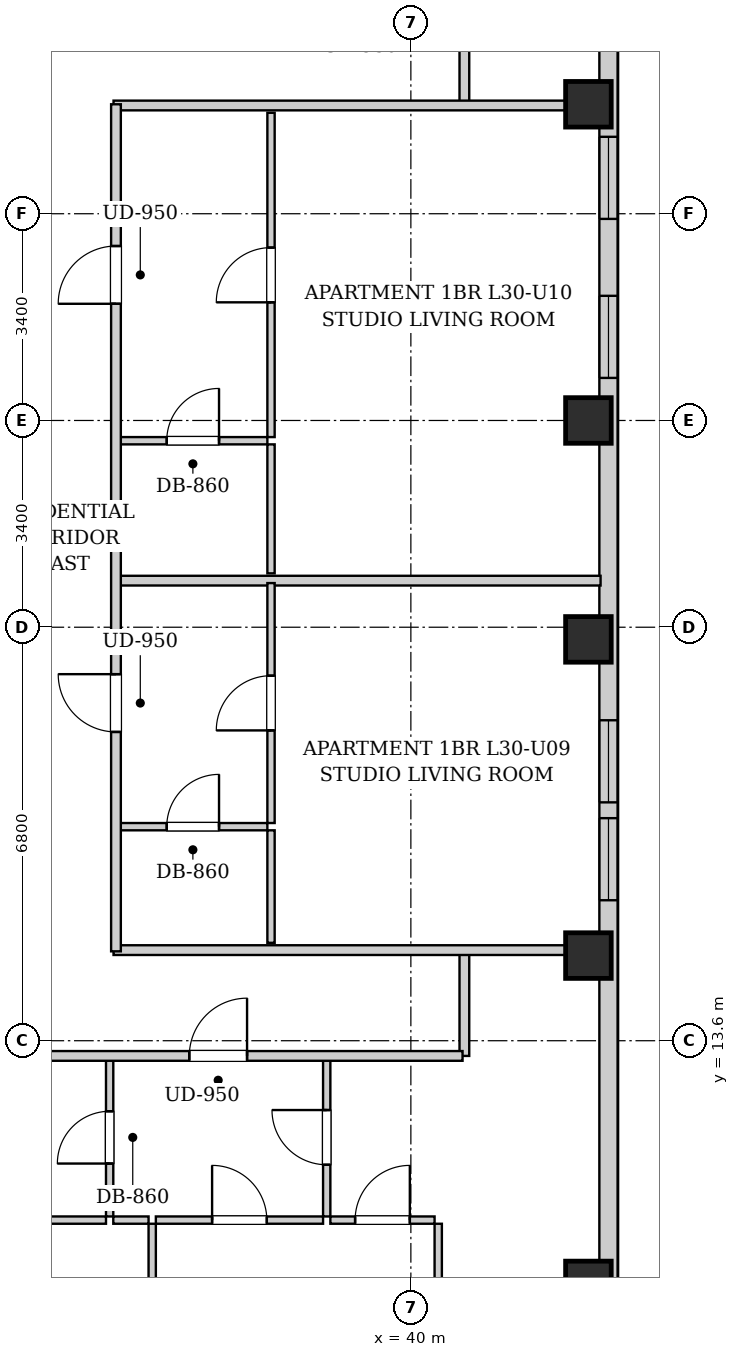
"""IFC4 building model, lengths in metres.
Left out: names, types, materials, properties, quantities, classifications, styles, units other than length and angle.
Written with IfcOpenShell. Run it as: python <this file> out.ifc"""

import sys

from ifc_helpers import new_model, si_unit, direction, frame, frame_2d, origin, origin_2d, place, context, subcontext, project, spatial, rectangle, extrude, element, fill, save


model = new_model("IFC4")
c1 = context("Model", 3, precision=1e-05, world=origin(), true_north=direction((0.0, 1.0)))
c2 = subcontext(c1, "Body", "Model", "MODEL_VIEW")
j1 = project(units=[si_unit("LENGTHUNIT", "METRE"), si_unit("PLANEANGLEUNIT", "RADIAN")], contexts=[c1])
p1 = place(None, origin())
s1 = spatial("IfcSite", under=j1, at=p1, CompositionType="ELEMENT")
p2 = place(p1, origin())
s2 = spatial("IfcBuilding", under=s1, at=p2, CompositionType="ELEMENT")
p3 = place(p2, frame((0.0, 0.0, 107.1)))
s3 = spatial("IfcBuildingStorey", under=s2, at=p3, CompositionType="ELEMENT", Elevation=107.1)
for number, where, z_axis, x_axis in (
    (1, (42.92, 9.6, 0.0), (0.0, 0.0, 1.0), (1.0, 0.0, 0.0)),
    (2, (42.92, 15.0, 0.0), (0.0, 0.0, 1.0), (1.0, 0.0, 0.0)),
    (3, (42.92, 20.2, 0.0), (0.0, 0.0, 1.0), (1.0, 0.0, 0.0)),
    (4, (42.92, 23.8, 0.0), (0.0, 0.0, 1.0), (1.0, 0.0, 0.0)),
    (5, (42.92, 29.0, 0.0), (0.0, 0.0, 1.0), (1.0, 0.0, 0.0)),
):
    element("IfcColumn", number, at=place(p3, frame(where, z_axis=z_axis, x_axis=x_axis)), inside=s3, PredefinedType="COLUMN", context=c2, shape_type="SweptSolid", body=[
        extrude(rectangle(XDim=0.75, YDim=0.75, at=origin_2d()), origin(), (0.0, 0.0, 1.0), 3.2),
    ])
p4 = place(p3, frame((43.25, 40.8, 0.0), z_axis=(0.0, 0.0, 1.0), x_axis=(0.0, -1.0, 0.0)))
e6 = element("IfcWall", 6, at=p4, inside=s3, PredefinedType="SOLIDWALL", context=c2, shape_type="SweptSolid", body=[
    extrude(rectangle(XDim=38.3, YDim=0.3, at=frame_2d((19.15, 0.0))), origin(), (0.0, 0.0, 1.0), 2.94),
])
p5 = place(p4, frame((33.495, 0.0, 0.55)))
e7 = element("IfcOpeningElement", 7, at=p5, cuts=e6, PredefinedType="OPENING", context=c2, shape_type="SweptSolid", body=[
    extrude(rectangle(XDim=1.35, YDim=1.2, at=frame_2d((0.675, 0.6))), frame((0.0, 0.16, 0.0), z_axis=(0.0, -1.0, 0.0), x_axis=(1.0, 0.0, 0.0)), (0.0, 0.0, 1.0), 0.32),
])
p6 = place(p4, frame((31.735, 0.0, 0.55)))
e8 = element("IfcOpeningElement", 8, at=p6, cuts=e6, PredefinedType="OPENING", context=c2, shape_type="SweptSolid", body=[
    extrude(rectangle(XDim=1.35, YDim=1.2, at=frame_2d((0.675, 0.6))), frame((0.0, 0.16, 0.0), z_axis=(0.0, -1.0, 0.0), x_axis=(1.0, 0.0, 0.0)), (0.0, 0.0, 1.0), 0.32),
])
p7 = place(p4, frame((21.93, 0.0, 0.55)))
e9 = element("IfcOpeningElement", 9, at=p7, cuts=e6, PredefinedType="OPENING", context=c2, shape_type="SweptSolid", body=[
    extrude(rectangle(XDim=1.35, YDim=1.2, at=frame_2d((0.675, 0.6))), frame((0.0, 0.16, 0.0), z_axis=(0.0, -1.0, 0.0), x_axis=(1.0, 0.0, 0.0)), (0.0, 0.0, 1.0), 0.32),
])
p8 = place(p4, frame((23.54, 0.0, 0.55)))
e10 = element("IfcOpeningElement", 10, at=p8, cuts=e6, PredefinedType="OPENING", context=c2, shape_type="SweptSolid", body=[
    extrude(rectangle(XDim=1.35, YDim=1.2, at=frame_2d((0.675, 0.6))), frame((0.0, 0.16, 0.0), z_axis=(0.0, -1.0, 0.0), x_axis=(1.0, 0.0, 0.0)), (0.0, 0.0, 1.0), 0.32),
])
p9 = place(p4, frame((14.95, 0.0, 0.55)))
e11 = element("IfcOpeningElement", 11, at=p9, cuts=e6, PredefinedType="OPENING", context=c2, shape_type="SweptSolid", body=[
    extrude(rectangle(XDim=1.35, YDim=1.2, at=frame_2d((0.675, 0.6))), frame((0.0, 0.16, 0.0), z_axis=(0.0, -1.0, 0.0), x_axis=(1.0, 0.0, 0.0)), (0.0, 0.0, 1.0), 0.32),
])
p10 = place(p4, frame((12.335, 0.0, 0.55)))
e12 = element("IfcOpeningElement", 12, at=p10, cuts=e6, PredefinedType="OPENING", context=c2, shape_type="SweptSolid", body=[
    extrude(rectangle(XDim=1.35, YDim=1.2, at=frame_2d((0.675, 0.6))), frame((0.0, 0.16, 0.0), z_axis=(0.0, -1.0, 0.0), x_axis=(1.0, 0.0, 0.0)), (0.0, 0.0, 1.0), 0.32),
])
for number, where, z_axis, x_axis in (
    (13, (40.88, 13.35, 0.0), (0.0, 0.0, 1.0), (0.0, 1.0, 0.0)),
    (14, (40.88, 28.98, 0.0), (0.0, 0.0, 1.0), (0.0, 1.0, 0.0)),
):
    element("IfcWall", number, at=place(p3, frame(where, z_axis=z_axis, x_axis=x_axis)), inside=s3, PredefinedType="PARTITIONING", context=c2, shape_type="SweptSolid", body=[
        extrude(rectangle(XDim=1.74, YDim=0.16, at=frame_2d((0.87, 0.0))), origin(), (0.0, 0.0, 1.0), 2.94),
    ])
for number, where, z_axis, x_axis in (
    (15, (35.11, 15.09, 0.0), (0.0, 0.0, 1.0), (1.0, 0.0, 0.0)),
    (16, (35.11, 28.98, 0.0), (0.0, 0.0, 1.0), (1.0, 0.0, 0.0)),
):
    element("IfcWall", number, at=place(p3, frame(where, z_axis=z_axis, x_axis=x_axis)), inside=s3, PredefinedType="PARTITIONING", context=c2, shape_type="SweptSolid", body=[
        extrude(rectangle(XDim=8.01, YDim=0.16, at=frame_2d((4.005, 0.0))), origin(), (0.0, 0.0, 1.0), 2.313),
    ])
p11 = place(p3, frame((35.046, 10.71, 0.0), z_axis=(0.0, 0.0, 1.0), x_axis=(0.0, 1.0, 0.0)))
e17 = element("IfcWall", 17, at=p11, inside=s3, PredefinedType="PARTITIONING", context=c2, shape_type="SweptSolid", body=[
    extrude(rectangle(XDim=2.6, YDim=0.12, at=frame_2d((1.3, 0.0))), origin(), (0.0, 0.0, 1.0), 2.94),
])
p12 = place(p11, frame((0.87, 0.0, 0.0)))
e18 = element("IfcOpeningElement", 18, at=p12, cuts=e17, PredefinedType="OPENING", context=c2, shape_type="SweptSolid", body=[
    extrude(rectangle(XDim=0.86, YDim=2.05, at=frame_2d((0.43, 1.025))), frame((0.0, 0.07, 0.0), z_axis=(0.0, -1.0, 0.0), x_axis=(1.0, 0.0, 0.0)), (0.0, 0.0, 1.0), 0.14),
])
p13 = place(p3, frame((32.586, 10.65, 0.0), z_axis=(0.0, 0.0, 1.0), x_axis=(1.0, 0.0, 0.0)))
e19 = element("IfcWall", 19, at=p13, inside=s3, PredefinedType="PARTITIONING", context=c2, shape_type="SweptSolid", body=[
    extrude(rectangle(XDim=2.4, YDim=0.12, at=frame_2d((1.2, 0.0))), origin(), (0.0, 0.0, 1.0), 2.94),
])
p14 = place(p3, frame((38.616, 10.71, 0.0), z_axis=(0.0, 0.0, 1.0), x_axis=(0.0, 1.0, 0.0)))
e20 = element("IfcWall", 20, at=p14, inside=s3, PredefinedType="PARTITIONING", context=c2, shape_type="SweptSolid", body=[
    extrude(rectangle(XDim=2.6, YDim=0.12, at=frame_2d((1.3, 0.0))), origin(), (0.0, 0.0, 1.0), 2.94),
])
p15 = place(p14, frame((0.85, 0.0, 0.0)))
e21 = element("IfcOpeningElement", 21, at=p15, cuts=e20, PredefinedType="OPENING", context=c2, shape_type="SweptSolid", body=[
    extrude(rectangle(XDim=0.9, YDim=2.05, at=frame_2d((0.45, 1.025))), frame((0.0, 0.07, 0.0), z_axis=(0.0, -1.0, 0.0), x_axis=(1.0, 0.0, 0.0)), (0.0, 0.0, 1.0), 0.14),
])
p16 = place(p3, frame((35.106, 10.65, 0.0), z_axis=(0.0, 0.0, 1.0), x_axis=(1.0, 0.0, 0.0)))
e22 = element("IfcWall", 22, at=p16, inside=s3, PredefinedType="PARTITIONING", context=c2, shape_type="SweptSolid", body=[
    extrude(rectangle(XDim=0.58, YDim=0.12, at=frame_2d((0.29, 0.0))), origin(), (0.0, 0.0, 1.0), 2.94),
])
p17 = place(p3, frame((35.806, 10.65, 0.0), z_axis=(0.0, 0.0, 1.0), x_axis=(1.0, 0.0, 0.0)))
e23 = element("IfcWall", 23, at=p17, inside=s3, PredefinedType="PARTITIONING", context=c2, shape_type="SweptSolid", body=[
    extrude(rectangle(XDim=2.75, YDim=0.12, at=frame_2d((1.375, 0.0))), origin(), (0.0, 0.0, 1.0), 2.94),
])
p18 = place(p17, frame((0.925, 0.0, 0.0)))
e24 = element("IfcOpeningElement", 24, at=p18, cuts=e23, PredefinedType="OPENING", context=c2, shape_type="SweptSolid", body=[
    extrude(rectangle(XDim=0.9, YDim=2.05, at=frame_2d((0.45, 1.025))), frame((0.0, 0.07, 0.0), z_axis=(0.0, -1.0, 0.0), x_axis=(1.0, 0.0, 0.0)), (0.0, 0.0, 1.0), 0.14),
])
p19 = place(p3, frame((38.676, 10.65, 0.0), z_axis=(0.0, 0.0, 1.0), x_axis=(1.0, 0.0, 0.0)))
e25 = element("IfcWall", 25, at=p19, inside=s3, PredefinedType="PARTITIONING", context=c2, shape_type="SweptSolid", body=[
    extrude(rectangle(XDim=1.714, YDim=0.12, at=frame_2d((0.857, 0.0))), origin(), (0.0, 0.0, 1.0), 2.94),
])
p20 = place(p19, frame((0.407, 0.0, 0.0)))
e26 = element("IfcOpeningElement", 26, at=p20, cuts=e25, PredefinedType="OPENING", context=c2, shape_type="SweptSolid", body=[
    extrude(rectangle(XDim=0.9, YDim=2.05, at=frame_2d((0.45, 1.025))), frame((0.0, 0.07, 0.0), z_axis=(0.0, -1.0, 0.0), x_axis=(1.0, 0.0, 0.0)), (0.0, 0.0, 1.0), 0.14),
])
p21 = place(p3, frame((35.746, 0.28, 0.0), z_axis=(0.0, 0.0, 1.0), x_axis=(0.0, 1.0, 0.0)))
e27 = element("IfcWall", 27, at=p21, inside=s3, PredefinedType="PARTITIONING", context=c2, shape_type="SweptSolid", body=[
    extrude(rectangle(XDim=10.31, YDim=0.12, at=frame_2d((5.155, 0.0))), origin(), (0.0, 0.0, 1.0), 2.94),
])
p22 = place(p21, frame((4.69, 0.0, 0.0)))
e28 = element("IfcOpeningElement", 28, at=p22, cuts=e27, PredefinedType="OPENING", context=c2, shape_type="SweptSolid", body=[
    extrude(rectangle(XDim=0.9, YDim=2.05, at=frame_2d((0.45, 1.025))), frame((0.0, 0.07, 0.0), z_axis=(0.0, -1.0, 0.0), x_axis=(1.0, 0.0, 0.0)), (0.0, 0.0, 1.0), 0.14),
])
p23 = place(p3, frame((40.45, 0.28, 0.0), z_axis=(0.0, 0.0, 1.0), x_axis=(0.0, 1.0, 0.0)))
e29 = element("IfcWall", 29, at=p23, inside=s3, PredefinedType="PARTITIONING", context=c2, shape_type="SweptSolid", body=[
    extrude(rectangle(XDim=10.31, YDim=0.12, at=frame_2d((5.155, 0.0))), origin(), (0.0, 0.0, 1.0), 2.94),
])
p24 = place(p23, frame((4.69, 0.0, 0.0)))
e30 = element("IfcOpeningElement", 30, at=p24, cuts=e29, PredefinedType="OPENING", context=c2, shape_type="SweptSolid", body=[
    extrude(rectangle(XDim=0.9, YDim=2.05, at=frame_2d((0.45, 1.025))), frame((0.0, 0.07, 0.0), z_axis=(0.0, -1.0, 0.0), x_axis=(1.0, 0.0, 0.0)), (0.0, 0.0, 1.0), 0.14),
])
p25 = place(p3, frame((35.19, 21.166, 0.0), z_axis=(0.0, 0.0, 1.0), x_axis=(1.0, 0.0, 0.0)))
e31 = element("IfcWall", 31, at=p25, inside=s3, PredefinedType="PARTITIONING", context=c2, shape_type="SweptSolid", body=[
    extrude(rectangle(XDim=7.93, YDim=0.16, at=frame_2d((3.965, 0.0))), origin(), (0.0, 0.0, 1.0), 2.94),
])
p26 = place(p3, frame((35.19, 17.12, 0.0), z_axis=(0.0, 0.0, 1.0), x_axis=(1.0, 0.0, 0.0)))
e32 = element("IfcWall", 32, at=p26, inside=s3, PredefinedType="PARTITIONING", context=c2, shape_type="SweptSolid", body=[
    extrude(rectangle(XDim=2.45, YDim=0.12, at=frame_2d((1.225, 0.0))), origin(), (0.0, 0.0, 1.0), 2.94),
])
p27 = place(p26, frame((0.795, 0.0, 0.0)))
e33 = element("IfcOpeningElement", 33, at=p27, cuts=e32, PredefinedType="OPENING", context=c2, shape_type="SweptSolid", body=[
    extrude(rectangle(XDim=0.86, YDim=2.05, at=frame_2d((0.43, 1.025))), frame((0.0, 0.07, 0.0), z_axis=(0.0, -1.0, 0.0), x_axis=(1.0, 0.0, 0.0)), (0.0, 0.0, 1.0), 0.14),
])
p28 = place(p3, frame((37.7, 15.21, 0.0), z_axis=(0.0, 0.0, 1.0), x_axis=(0.0, 1.0, 0.0)))
e34 = element("IfcWall", 34, at=p28, inside=s3, PredefinedType="PARTITIONING", context=c2, shape_type="SweptSolid", body=[
    extrude(rectangle(XDim=1.85, YDim=0.12, at=frame_2d((0.925, 0.0))), origin(), (0.0, 0.0, 1.0), 2.94),
])
p29 = place(p3, frame((37.7, 17.18, 0.0), z_axis=(0.0, 0.0, 1.0), x_axis=(0.0, 1.0, 0.0)))
e35 = element("IfcWall", 35, at=p29, inside=s3, PredefinedType="PARTITIONING", context=c2, shape_type="SweptSolid", body=[
    extrude(rectangle(XDim=3.946, YDim=0.12, at=frame_2d((1.973, 0.0))), origin(), (0.0, 0.0, 1.0), 2.94),
])
p30 = place(p29, frame((1.523, 0.0, 0.0)))
e36 = element("IfcOpeningElement", 36, at=p30, cuts=e35, PredefinedType="OPENING", context=c2, shape_type="SweptSolid", body=[
    extrude(rectangle(XDim=0.9, YDim=2.05, at=frame_2d((0.45, 1.025))), frame((0.0, 0.07, 0.0), z_axis=(0.0, -1.0, 0.0), x_axis=(1.0, 0.0, 0.0)), (0.0, 0.0, 1.0), 0.14),
])
p31 = place(p3, frame((35.19, 23.467, 0.0), z_axis=(0.0, 0.0, 1.0), x_axis=(1.0, 0.0, 0.0)))
e37 = element("IfcWall", 37, at=p31, inside=s3, PredefinedType="PARTITIONING", context=c2, shape_type="SweptSolid", body=[
    extrude(rectangle(XDim=2.45, YDim=0.12, at=frame_2d((1.225, 0.0))), origin(), (0.0, 0.0, 1.0), 2.94),
])
p32 = place(p31, frame((0.795, 0.0, 0.0)))
e38 = element("IfcOpeningElement", 38, at=p32, cuts=e37, PredefinedType="OPENING", context=c2, shape_type="SweptSolid", body=[
    extrude(rectangle(XDim=0.86, YDim=2.05, at=frame_2d((0.43, 1.025))), frame((0.0, 0.07, 0.0), z_axis=(0.0, -1.0, 0.0), x_axis=(1.0, 0.0, 0.0)), (0.0, 0.0, 1.0), 0.14),
])
p33 = place(p3, frame((37.7, 21.286, 0.0), z_axis=(0.0, 0.0, 1.0), x_axis=(0.0, 1.0, 0.0)))
e39 = element("IfcWall", 39, at=p33, inside=s3, PredefinedType="PARTITIONING", context=c2, shape_type="SweptSolid", body=[
    extrude(rectangle(XDim=2.121, YDim=0.12, at=frame_2d((1.061, 0.0))), origin(), (0.0, 0.0, 1.0), 2.94),
])
p34 = place(p3, frame((37.7, 23.527, 0.0), z_axis=(0.0, 0.0, 1.0), x_axis=(0.0, 1.0, 0.0)))
e40 = element("IfcWall", 40, at=p34, inside=s3, PredefinedType="PARTITIONING", context=c2, shape_type="SweptSolid", body=[
    extrude(rectangle(XDim=5.333, YDim=0.12, at=frame_2d((2.667, 0.0))), origin(), (0.0, 0.0, 1.0), 2.94),
])
p35 = place(p34, frame((2.216, 0.0, 0.0)))
e41 = element("IfcOpeningElement", 41, at=p35, cuts=e40, PredefinedType="OPENING", context=c2, shape_type="SweptSolid", body=[
    extrude(rectangle(XDim=0.9, YDim=2.05, at=frame_2d((0.45, 1.025))), frame((0.0, 0.07, 0.0), z_axis=(0.0, -1.0, 0.0), x_axis=(1.0, 0.0, 0.0)), (0.0, 0.0, 1.0), 0.14),
])
p36 = place(p3, frame((10.05, 13.35, 0.0), z_axis=(0.0, 0.0, 1.0), x_axis=(1.0, 0.0, 0.0)))
e42 = element("IfcWall", 42, at=p36, inside=s3, PredefinedType="PARTITIONING", context=c2, shape_type="SweptSolid", body=[
    extrude(rectangle(XDim=30.8, YDim=0.16, at=frame_2d((15.4, 0.0))), origin(), (0.0, 0.0, 1.0), 2.94),
])
p37 = place(p36, frame((2.893, 0.0, 0.0)))
e43 = element("IfcOpeningElement", 43, at=p37, cuts=e42, PredefinedType="OPENING", context=c2, shape_type="SweptSolid", body=[
    extrude(rectangle(XDim=0.95, YDim=2.1, at=frame_2d((0.475, 1.05))), frame((0.0, 0.09, 0.0), z_axis=(0.0, -1.0, 0.0), x_axis=(1.0, 0.0, 0.0)), (0.0, 0.0, 1.0), 0.18),
])
p38 = place(p36, frame((9.161, 0.0, 0.0)))
e44 = element("IfcOpeningElement", 44, at=p38, cuts=e42, PredefinedType="OPENING", context=c2, shape_type="SweptSolid", body=[
    extrude(rectangle(XDim=0.95, YDim=2.1, at=frame_2d((0.475, 1.05))), frame((0.0, 0.09, 0.0), z_axis=(0.0, -1.0, 0.0), x_axis=(1.0, 0.0, 0.0)), (0.0, 0.0, 1.0), 0.18),
])
p39 = place(p36, frame((26.306, 0.0, 0.0)))
e45 = element("IfcOpeningElement", 45, at=p39, cuts=e42, PredefinedType="OPENING", context=c2, shape_type="SweptSolid", body=[
    extrude(rectangle(XDim=0.95, YDim=2.1, at=frame_2d((0.475, 1.05))), frame((0.0, 0.09, 0.0), z_axis=(0.0, -1.0, 0.0), x_axis=(1.0, 0.0, 0.0)), (0.0, 0.0, 1.0), 0.18),
])
p40 = place(p3, frame((35.15, 15.07, 0.0), z_axis=(0.0, 0.0, 1.0), x_axis=(0.0, 1.0, 0.0)))
e46 = element("IfcWall", 46, at=p40, inside=s3, PredefinedType="PARTITIONING", context=c2, shape_type="SweptSolid", body=[
    extrude(rectangle(XDim=13.93, YDim=0.16, at=frame_2d((6.965, 0.0))), origin(), (0.0, 0.0, 1.0), 2.94),
])
p41 = place(p40, frame((3.608, 0.0, 0.0)))
e47 = element("IfcOpeningElement", 47, at=p41, cuts=e46, PredefinedType="OPENING", context=c2, shape_type="SweptSolid", body=[
    extrude(rectangle(XDim=0.95, YDim=2.1, at=frame_2d((0.475, 1.05))), frame((0.0, 0.09, 0.0), z_axis=(0.0, -1.0, 0.0), x_axis=(1.0, 0.0, 0.0)), (0.0, 0.0, 1.0), 0.18),
])
p42 = place(p40, frame((10.649, 0.0, 0.0)))
e48 = element("IfcOpeningElement", 48, at=p42, cuts=e46, PredefinedType="OPENING", context=c2, shape_type="SweptSolid", body=[
    extrude(rectangle(XDim=0.95, YDim=2.1, at=frame_2d((0.475, 1.05))), frame((0.0, 0.09, 0.0), z_axis=(0.0, -1.0, 0.0), x_axis=(1.0, 0.0, 0.0)), (0.0, 0.0, 1.0), 0.18),
])
p43 = place(p12, origin())
e49 = element("IfcDoor", 49, at=p43, inside=s3, OperationType="SINGLE_SWING_LEFT", PredefinedType="DOOR", context=c2, shape_type="SweptSolid", body=[
    extrude(rectangle(XDim=0.86, YDim=2.05, at=frame_2d((0.43, 1.025))), frame((0.0, 0.025, 0.0), z_axis=(0.0, -1.0, 0.0), x_axis=(1.0, 0.0, 0.0)), (0.0, 0.0, 1.0), 0.05),
])
fill(e18, e49)
p44 = place(p15, origin())
e50 = element("IfcDoor", 50, at=p44, inside=s3, OperationType="SINGLE_SWING_RIGHT", PredefinedType="DOOR", context=c2, shape_type="SweptSolid", body=[
    extrude(rectangle(XDim=0.9, YDim=2.05, at=frame_2d((0.45, 1.025))), frame((0.0, 0.025, 0.0), z_axis=(0.0, -1.0, 0.0), x_axis=(1.0, 0.0, 0.0)), (0.0, 0.0, 1.0), 0.05),
])
fill(e21, e50)
p45 = place(p18, origin())
e51 = element("IfcDoor", 51, at=p45, inside=s3, OperationType="SINGLE_SWING_LEFT", PredefinedType="DOOR", context=c2, shape_type="SweptSolid", body=[
    extrude(rectangle(XDim=0.9, YDim=2.05, at=frame_2d((0.45, 1.025))), frame((0.0, 0.025, 0.0), z_axis=(0.0, -1.0, 0.0), x_axis=(1.0, 0.0, 0.0)), (0.0, 0.0, 1.0), 0.05),
])
fill(e24, e51)
p46 = place(p20, origin())
e52 = element("IfcDoor", 52, at=p46, inside=s3, OperationType="SINGLE_SWING_RIGHT", PredefinedType="DOOR", context=c2, shape_type="SweptSolid", body=[
    extrude(rectangle(XDim=0.9, YDim=2.05, at=frame_2d((0.45, 1.025))), frame((0.0, 0.025, 0.0), z_axis=(0.0, -1.0, 0.0), x_axis=(1.0, 0.0, 0.0)), (0.0, 0.0, 1.0), 0.05),
])
fill(e26, e52)
p47 = place(p27, origin())
e53 = element("IfcDoor", 53, at=p47, inside=s3, OperationType="SINGLE_SWING_RIGHT", PredefinedType="DOOR", context=c2, shape_type="SweptSolid", body=[
    extrude(rectangle(XDim=0.86, YDim=2.05, at=frame_2d((0.43, 1.025))), frame((0.0, 0.025, 0.0), z_axis=(0.0, -1.0, 0.0), x_axis=(1.0, 0.0, 0.0)), (0.0, 0.0, 1.0), 0.05),
])
fill(e33, e53)
p48 = place(p30, origin())
e54 = element("IfcDoor", 54, at=p48, inside=s3, OperationType="SINGLE_SWING_LEFT", PredefinedType="DOOR", context=c2, shape_type="SweptSolid", body=[
    extrude(rectangle(XDim=0.9, YDim=2.05, at=frame_2d((0.45, 1.025))), frame((0.0, 0.025, 0.0), z_axis=(0.0, -1.0, 0.0), x_axis=(1.0, 0.0, 0.0)), (0.0, 0.0, 1.0), 0.05),
])
fill(e36, e54)
p49 = place(p32, origin())
e55 = element("IfcDoor", 55, at=p49, inside=s3, OperationType="SINGLE_SWING_RIGHT", PredefinedType="DOOR", context=c2, shape_type="SweptSolid", body=[
    extrude(rectangle(XDim=0.86, YDim=2.05, at=frame_2d((0.43, 1.025))), frame((0.0, 0.025, 0.0), z_axis=(0.0, -1.0, 0.0), x_axis=(1.0, 0.0, 0.0)), (0.0, 0.0, 1.0), 0.05),
])
fill(e38, e55)
p50 = place(p35, origin())
e56 = element("IfcDoor", 56, at=p50, inside=s3, OperationType="SINGLE_SWING_LEFT", PredefinedType="DOOR", context=c2, shape_type="SweptSolid", body=[
    extrude(rectangle(XDim=0.9, YDim=2.05, at=frame_2d((0.45, 1.025))), frame((0.0, 0.025, 0.0), z_axis=(0.0, -1.0, 0.0), x_axis=(1.0, 0.0, 0.0)), (0.0, 0.0, 1.0), 0.05),
])
fill(e41, e56)
p51 = place(p39, origin())
e57 = element("IfcDoor", 57, at=p51, inside=s3, OperationType="SINGLE_SWING_RIGHT", PredefinedType="DOOR", context=c2, shape_type="SweptSolid", body=[
    extrude(rectangle(XDim=0.95, YDim=2.1, at=frame_2d((0.475, 1.05))), frame((0.0, 0.025, 0.0), z_axis=(0.0, -1.0, 0.0), x_axis=(1.0, 0.0, 0.0)), (0.0, 0.0, 1.0), 0.05),
])
fill(e45, e57)
p52 = place(p41, origin())
e58 = element("IfcDoor", 58, at=p52, inside=s3, OperationType="SINGLE_SWING_RIGHT", PredefinedType="DOOR", context=c2, shape_type="SweptSolid", body=[
    extrude(rectangle(XDim=0.95, YDim=2.1, at=frame_2d((0.475, 1.05))), frame((0.0, 0.025, 0.0), z_axis=(0.0, -1.0, 0.0), x_axis=(1.0, 0.0, 0.0)), (0.0, 0.0, 1.0), 0.05),
])
fill(e47, e58)
p53 = place(p42, origin())
e59 = element("IfcDoor", 59, at=p53, inside=s3, OperationType="SINGLE_SWING_LEFT", PredefinedType="DOOR", context=c2, shape_type="SweptSolid", body=[
    extrude(rectangle(XDim=0.95, YDim=2.1, at=frame_2d((0.475, 1.05))), frame((0.0, 0.025, 0.0), z_axis=(0.0, -1.0, 0.0), x_axis=(1.0, 0.0, 0.0)), (0.0, 0.0, 1.0), 0.05),
])
fill(e48, e59)
p54 = place(p7, origin())
e60 = element("IfcWindow", 60, at=p54, inside=s3, PartitioningType="SINGLE_PANEL", PredefinedType="WINDOW", context=c2, shape_type="SweptSolid", body=[
    extrude(rectangle(XDim=1.35, YDim=1.2, at=frame_2d((0.675, 0.6))), frame((0.0, 0.03, 0.0), z_axis=(0.0, -1.0, 0.0), x_axis=(1.0, 0.0, 0.0)), (0.0, 0.0, 1.0), 0.06),
])
fill(e9, e60)
p55 = place(p8, origin())
e61 = element("IfcWindow", 61, at=p55, inside=s3, PartitioningType="SINGLE_PANEL", PredefinedType="WINDOW", context=c2, shape_type="SweptSolid", body=[
    extrude(rectangle(XDim=1.35, YDim=1.2, at=frame_2d((0.675, 0.6))), frame((0.0, 0.03, 0.0), z_axis=(0.0, -1.0, 0.0), x_axis=(1.0, 0.0, 0.0)), (0.0, 0.0, 1.0), 0.06),
])
fill(e10, e61)
p56 = place(p9, origin())
e62 = element("IfcWindow", 62, at=p56, inside=s3, PartitioningType="SINGLE_PANEL", PredefinedType="WINDOW", context=c2, shape_type="SweptSolid", body=[
    extrude(rectangle(XDim=1.35, YDim=1.2, at=frame_2d((0.675, 0.6))), frame((0.0, 0.03, 0.0), z_axis=(0.0, -1.0, 0.0), x_axis=(1.0, 0.0, 0.0)), (0.0, 0.0, 1.0), 0.06),
])
fill(e11, e62)
p57 = place(p10, origin())
e63 = element("IfcWindow", 63, at=p57, inside=s3, PartitioningType="SINGLE_PANEL", PredefinedType="WINDOW", context=c2, shape_type="SweptSolid", body=[
    extrude(rectangle(XDim=1.35, YDim=1.2, at=frame_2d((0.675, 0.6))), frame((0.0, 0.03, 0.0), z_axis=(0.0, -1.0, 0.0), x_axis=(1.0, 0.0, 0.0)), (0.0, 0.0, 1.0), 0.06),
])
fill(e12, e63)
save(model, sys.argv[1])
